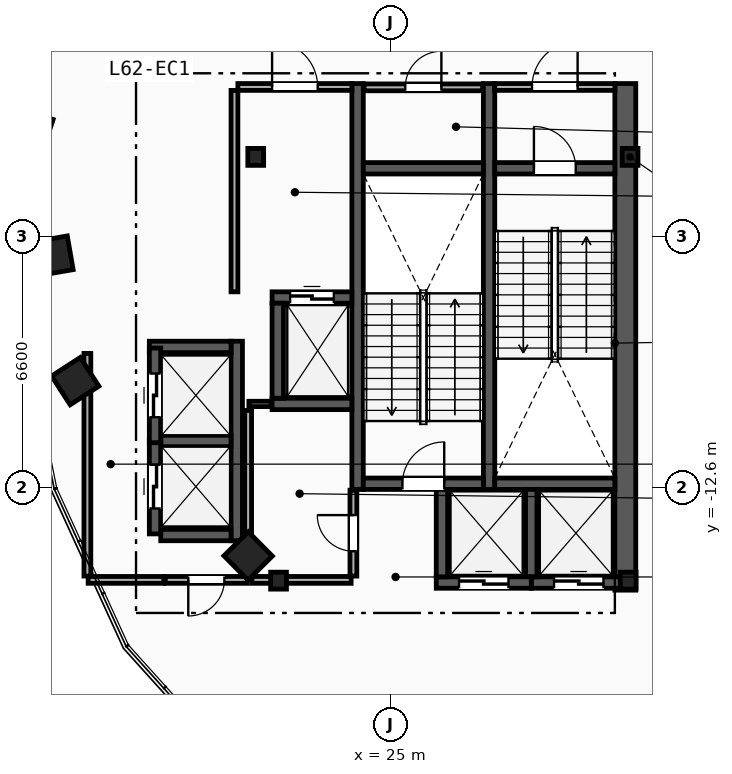
"""IFC4 building model, lengths in metres.
Left out: names, types, materials, properties, quantities, classifications, styles, units other than length and angle.
Written with IfcOpenShell. Run it as: python <this file> out.ifc"""

import sys

from ifc_helpers import new_model, si_unit, direction, frame, frame_2d, origin, origin_2d, place, context, subcontext, project, spatial, rectangle, i_section, extrude, element, fill, save


model = new_model("IFC4")
c1 = context("Model", 3, precision=1e-05, world=origin(), true_north=direction((0.0, 1.0)))
c2 = subcontext(c1, "Body", "Model", "MODEL_VIEW")
j1 = project(units=[si_unit("LENGTHUNIT", "METRE"), si_unit("PLANEANGLEUNIT", "RADIAN")], contexts=[c1])
p1 = place(None, origin())
s1 = spatial("IfcSite", under=j1, at=p1, CompositionType="ELEMENT")
p2 = place(p1, origin())
s2 = spatial("IfcBuilding", under=s1, at=p2, CompositionType="ELEMENT")
p3 = place(p2, frame((0.0, 0.0, 235.0)))
s3 = spatial("IfcBuildingStorey", under=s2, at=p3, CompositionType="ELEMENT", Elevation=235.0)
for number, where, z_axis, x_axis in (
    (1, (31.3, -3.9, 0.0), (0.0, 0.0, 1.0), (1.0, 0.0, 0.0)),
    (2, (21.45, -3.9, 0.0), (0.0, 0.0, 1.0), (1.0, 0.0, 0.0)),
    (3, (22.05, -15.05, 0.0), (0.0, 0.0, 1.0), (1.0, 0.0, 0.0)),
    (4, (31.25, -15.05, 0.0), (0.0, 0.0, 1.0), (1.0, 0.0, 0.0)),
):
    element("IfcColumn", number, at=place(p3, frame(where, z_axis=z_axis, x_axis=x_axis)), inside=s3, PredefinedType="COLUMN", context=c2, shape_type="SweptSolid", body=[
        extrude(i_section(OverallWidth=0.416, OverallDepth=0.446, WebThickness=0.039, FlangeThickness=0.063, FilletRadius=0.018, at=origin_2d()), origin(), (0.0, 0.0, 1.0), 4.6),
    ])
for number, where, z_axis, x_axis in (
    (5, (15.55, -3.2, 0.0), (0.0, 0.0, 1.0), (-0.315, -0.949, 0.0)),
    (6, (16.125, -6.5, 0.0), (0.0, 0.0, 1.0), (0.172, -0.985, 0.0)),
    (7, (16.7, -9.8, 0.0), (0.0, 0.0, 1.0), (0.544, -0.839, 0.0)),
    (8, (21.25, -14.4, 0.0), (0.0, 0.0, 1.0), (0.703, -0.711, 0.0)),
):
    element("IfcColumn", number, at=place(p3, frame(where, z_axis=z_axis, x_axis=x_axis)), inside=s3, PredefinedType="COLUMN", context=c2, shape_type="SweptSolid", body=[
        extrude(rectangle(XDim=0.9, YDim=0.9, at=origin_2d()), origin(), (0.0, 0.0, 1.0), 4.6),
    ])
p4 = place(p3, frame((31.175, -15.3, 0.0), z_axis=(0.0, 0.0, 1.0), x_axis=(0.0, 1.0, 0.0)))
e9 = element("IfcWall", 9, at=p4, inside=s3, PredefinedType="SHEAR", context=c2, shape_type="SweptSolid", body=[
    extrude(rectangle(XDim=13.33, YDim=0.55, at=frame_2d((6.665, 0.0))), origin(), (0.0, 0.0, 1.0), 4.34),
])
for number, where, z_axis, x_axis in (
    (10, (27.59, -12.65, 0.0), (0.0, 0.0, 1.0), (0.0, 1.0, 0.0)),
    (11, (24.13, -12.65, 0.0), (0.0, 0.0, 1.0), (0.0, 1.0, 0.0)),
):
    element("IfcWall", number, at=place(p3, frame(where, z_axis=z_axis, x_axis=x_axis)), inside=s3, PredefinedType="SHEAR", context=c2, shape_type="SweptSolid", body=[
        extrude(rectangle(XDim=10.68, YDim=0.3, at=frame_2d((5.34, 0.0))), origin(), (0.0, 0.0, 1.0), 4.34),
    ])
p5 = place(p3, frame((27.74, -4.2, 0.0), z_axis=(0.0, 0.0, 1.0), x_axis=(1.0, 0.0, 0.0)))
e12 = element("IfcWall", 12, at=p5, inside=s3, PredefinedType="SHEAR", context=c2, shape_type="SweptSolid", body=[
    extrude(rectangle(XDim=3.16, YDim=0.3, at=frame_2d((1.58, 0.0))), origin(), (0.0, 0.0, 1.0), 4.34),
])
p6 = place(p5, frame((1.03, 0.0, 0.0)))
e13 = element("IfcOpeningElement", 13, at=p6, cuts=e12, PredefinedType="OPENING", context=c2, shape_type="SweptSolid", body=[
    extrude(rectangle(XDim=1.1, YDim=2.15, at=frame_2d((0.55, 1.075))), frame((0.0, 0.16, 0.0), z_axis=(0.0, -1.0, 0.0), x_axis=(1.0, 0.0, 0.0)), (0.0, 0.0, 1.0), 0.32),
])
p7 = place(p3, frame((27.74, -12.5, 0.0), z_axis=(0.0, 0.0, 1.0), x_axis=(1.0, 0.0, 0.0)))
e14 = element("IfcWall", 14, at=p7, inside=s3, PredefinedType="SHEAR", context=c2, shape_type="SweptSolid", body=[
    extrude(rectangle(XDim=3.16, YDim=0.3, at=frame_2d((1.58, 0.0))), origin(), (0.0, 0.0, 1.0), 4.34),
])
p8 = place(p3, frame((24.28, -12.5, 0.0), z_axis=(0.0, 0.0, 1.0), x_axis=(1.0, 0.0, 0.0)))
e15 = element("IfcWall", 15, at=p8, inside=s3, PredefinedType="SHEAR", context=c2, shape_type="SweptSolid", body=[
    extrude(rectangle(XDim=3.16, YDim=0.3, at=frame_2d((1.58, 0.0))), origin(), (0.0, 0.0, 1.0), 4.34),
])
p9 = place(p8, frame((1.03, 0.0, 0.0)))
e16 = element("IfcOpeningElement", 16, at=p9, cuts=e15, PredefinedType="OPENING", context=c2, shape_type="SweptSolid", body=[
    extrude(rectangle(XDim=1.1, YDim=2.15, at=frame_2d((0.55, 1.075))), frame((0.0, 0.16, 0.0), z_axis=(0.0, -1.0, 0.0), x_axis=(1.0, 0.0, 0.0)), (0.0, 0.0, 1.0), 0.32),
])
p10 = place(p3, frame((24.28, -4.2, 0.0), z_axis=(0.0, 0.0, 1.0), x_axis=(1.0, 0.0, 0.0)))
e17 = element("IfcWall", 17, at=p10, inside=s3, PredefinedType="SHEAR", context=c2, shape_type="SweptSolid", body=[
    extrude(rectangle(XDim=3.16, YDim=0.3, at=frame_2d((1.58, 0.0))), origin(), (0.0, 0.0, 1.0), 4.34),
])
p11 = place(p3, frame((20.89, -7.45, 0.0), z_axis=(0.0, 0.0, 1.0), x_axis=(0.0, 1.0, 0.0)))
e18 = element("IfcWall", 18, at=p11, inside=s3, PredefinedType="PARTITIONING", context=c2, shape_type="SweptSolid", body=[
    extrude(rectangle(XDim=5.3, YDim=0.18, at=frame_2d((2.65, 0.0))), origin(), (0.0, 0.0, 1.0), 4.34),
])
p12 = place(p3, frame((20.98, -2.06, 0.0), z_axis=(0.0, 0.0, 1.0), x_axis=(1.0, 0.0, 0.0)))
e19 = element("IfcWall", 19, at=p12, inside=s3, PredefinedType="PARTITIONING", context=c2, shape_type="SweptSolid", body=[
    extrude(rectangle(XDim=3.0, YDim=0.18, at=frame_2d((1.5, 0.0))), origin(), (0.0, 0.0, 1.0), 4.34),
])
p13 = place(p12, frame((0.9, 0.0, 0.0)))
e20 = element("IfcOpeningElement", 20, at=p13, cuts=e19, PredefinedType="OPENING", context=c2, shape_type="SweptSolid", body=[
    extrude(rectangle(XDim=1.2, YDim=2.15, at=frame_2d((0.6, 1.075))), frame((0.0, 0.1, 0.0), z_axis=(0.0, -1.0, 0.0), x_axis=(1.0, 0.0, 0.0)), (0.0, 0.0, 1.0), 0.2),
])
p14 = place(p3, frame((27.74, -2.06, 0.0), z_axis=(0.0, 0.0, 1.0), x_axis=(1.0, 0.0, 0.0)))
e21 = element("IfcWall", 21, at=p14, inside=s3, PredefinedType="PARTITIONING", context=c2, shape_type="SweptSolid", body=[
    extrude(rectangle(XDim=3.16, YDim=0.18, at=frame_2d((1.58, 0.0))), origin(), (0.0, 0.0, 1.0), 4.34),
])
p15 = place(p14, frame((0.98, 0.0, 0.0)))
e22 = element("IfcOpeningElement", 22, at=p15, cuts=e21, PredefinedType="OPENING", context=c2, shape_type="SweptSolid", body=[
    extrude(rectangle(XDim=1.2, YDim=2.15, at=frame_2d((0.6, 1.075))), frame((0.0, 0.1, 0.0), z_axis=(0.0, -1.0, 0.0), x_axis=(1.0, 0.0, 0.0)), (0.0, 0.0, 1.0), 0.2),
])
p16 = place(p3, frame((21.88, -7.6, 0.0), z_axis=(0.0, 0.0, 1.0), x_axis=(1.0, 0.0, 0.0)))
e23 = element("IfcWall", 23, at=p16, inside=s3, PredefinedType="SHEAR", context=c2, shape_type="SweptSolid", body=[
    extrude(rectangle(XDim=2.1, YDim=0.3, at=frame_2d((1.05, 0.0))), origin(), (0.0, 0.0, 1.0), 4.34),
])
p17 = place(p16, frame((0.475, 0.0, 0.0)))
e24 = element("IfcOpeningElement", 24, at=p17, cuts=e23, PredefinedType="OPENING", context=c2, shape_type="SweptSolid", body=[
    extrude(rectangle(XDim=1.15, YDim=2.2, at=frame_2d((0.575, 1.1))), frame((0.0, 0.16, 0.0), z_axis=(0.0, -1.0, 0.0), x_axis=(1.0, 0.0, 0.0)), (0.0, 0.0, 1.0), 0.32),
])
p18 = place(p3, frame((21.88, -10.4, 0.0), z_axis=(0.0, 0.0, 1.0), x_axis=(1.0, 0.0, 0.0)))
e25 = element("IfcWall", 25, at=p18, inside=s3, PredefinedType="SHEAR", context=c2, shape_type="SweptSolid", body=[
    extrude(rectangle(XDim=2.1, YDim=0.3, at=frame_2d((1.05, 0.0))), origin(), (0.0, 0.0, 1.0), 4.34),
])
p19 = place(p3, frame((22.03, -10.25, 0.0), z_axis=(0.0, 0.0, 1.0), x_axis=(0.0, 1.0, 0.0)))
e26 = element("IfcWall", 26, at=p19, inside=s3, PredefinedType="SHEAR", context=c2, shape_type="SweptSolid", body=[
    extrude(rectangle(XDim=2.5, YDim=0.3, at=frame_2d((1.25, 0.0))), origin(), (0.0, 0.0, 1.0), 4.34),
])
p20 = place(p3, frame((28.7, -15.1, 0.0), z_axis=(0.0, 0.0, 1.0), x_axis=(1.0, 0.0, 0.0)))
e27 = element("IfcWall", 27, at=p20, inside=s3, PredefinedType="SHEAR", context=c2, shape_type="SweptSolid", body=[
    extrude(rectangle(XDim=2.5, YDim=0.3, at=frame_2d((1.25, 0.0))), origin(), (0.0, 0.0, 1.0), 4.34),
])
p21 = place(p20, frame((0.6, 0.0, 0.0)))
e28 = element("IfcOpeningElement", 28, at=p21, cuts=e27, PredefinedType="OPENING", context=c2, shape_type="SweptSolid", body=[
    extrude(rectangle(XDim=1.3, YDim=2.2, at=frame_2d((0.65, 1.1))), frame((0.0, 0.16, 0.0), z_axis=(0.0, -1.0, 0.0), x_axis=(1.0, 0.0, 0.0)), (0.0, 0.0, 1.0), 0.32),
])
p22 = place(p3, frame((28.7, -14.95, 0.0), z_axis=(0.0, 0.0, 1.0), x_axis=(0.0, 1.0, 0.0)))
e29 = element("IfcWall", 29, at=p22, inside=s3, PredefinedType="SHEAR", context=c2, shape_type="SweptSolid", body=[
    extrude(rectangle(XDim=2.3, YDim=0.3, at=frame_2d((1.15, 0.0))), origin(), (0.0, 0.0, 1.0), 4.34),
])
p23 = place(p3, frame((26.2, -15.1, 0.0), z_axis=(0.0, 0.0, 1.0), x_axis=(1.0, 0.0, 0.0)))
e30 = element("IfcWall", 30, at=p23, inside=s3, PredefinedType="SHEAR", context=c2, shape_type="SweptSolid", body=[
    extrude(rectangle(XDim=2.5, YDim=0.3, at=frame_2d((1.25, 0.0))), origin(), (0.0, 0.0, 1.0), 4.34),
])
p24 = place(p23, frame((0.6, 0.0, 0.0)))
e31 = element("IfcOpeningElement", 31, at=p24, cuts=e30, PredefinedType="OPENING", context=c2, shape_type="SweptSolid", body=[
    extrude(rectangle(XDim=1.3, YDim=2.2, at=frame_2d((0.65, 1.1))), frame((0.0, 0.16, 0.0), z_axis=(0.0, -1.0, 0.0), x_axis=(1.0, 0.0, 0.0)), (0.0, 0.0, 1.0), 0.32),
])
p25 = place(p3, frame((26.35, -14.95, 0.0), z_axis=(0.0, 0.0, 1.0), x_axis=(0.0, 1.0, 0.0)))
e32 = element("IfcWall", 32, at=p25, inside=s3, PredefinedType="SHEAR", context=c2, shape_type="SweptSolid", body=[
    extrude(rectangle(XDim=2.3, YDim=0.3, at=frame_2d((1.15, 0.0))), origin(), (0.0, 0.0, 1.0), 4.34),
])
p26 = place(p3, frame((20.95, -14.0, 0.0), z_axis=(0.0, 0.0, 1.0), x_axis=(0.0, 1.0, 0.0)))
e33 = element("IfcWall", 33, at=p26, inside=s3, PredefinedType="SHEAR", context=c2, shape_type="SweptSolid", body=[
    extrude(rectangle(XDim=5.25, YDim=0.3, at=frame_2d((2.625, 0.0))), origin(), (0.0, 0.0, 1.0), 4.34),
])
p27 = place(p3, frame((18.95, -13.85, 0.0), z_axis=(0.0, 0.0, 1.0), x_axis=(1.0, 0.0, 0.0)))
e34 = element("IfcWall", 34, at=p27, inside=s3, PredefinedType="SHEAR", context=c2, shape_type="SweptSolid", body=[
    extrude(rectangle(XDim=1.85, YDim=0.3, at=frame_2d((0.925, 0.0))), origin(), (0.0, 0.0, 1.0), 4.34),
])
p28 = place(p3, frame((18.65, -8.9, 0.0), z_axis=(0.0, 0.0, 1.0), x_axis=(1.0, 0.0, 0.0)))
e35 = element("IfcWall", 35, at=p28, inside=s3, PredefinedType="SHEAR", context=c2, shape_type="SweptSolid", body=[
    extrude(rectangle(XDim=2.15, YDim=0.3, at=frame_2d((1.075, 0.0))), origin(), (0.0, 0.0, 1.0), 4.34),
])
p29 = place(p3, frame((18.95, -11.375, 0.0), z_axis=(0.0, 0.0, 1.0), x_axis=(1.0, 0.0, 0.0)))
e36 = element("IfcWall", 36, at=p29, inside=s3, PredefinedType="SHEAR", context=c2, shape_type="SweptSolid", body=[
    extrude(rectangle(XDim=1.85, YDim=0.3, at=frame_2d((0.925, 0.0))), origin(), (0.0, 0.0, 1.0), 4.34),
])
p30 = place(p3, frame((18.8, -13.82, 0.0), z_axis=(0.0, 0.0, 1.0), x_axis=(0.0, 1.0, 0.0)))
e37 = element("IfcWall", 37, at=p30, inside=s3, PredefinedType="SHEAR", context=c2, shape_type="SweptSolid", body=[
    extrude(rectangle(XDim=2.49, YDim=0.3, at=frame_2d((1.245, 0.0))), origin(), (0.0, 0.0, 1.0), 4.34),
])
p31 = place(p30, frame((0.67, 0.0, 0.0)))
e38 = element("IfcOpeningElement", 38, at=p31, cuts=e37, PredefinedType="OPENING", context=c2, shape_type="SweptSolid", body=[
    extrude(rectangle(XDim=1.15, YDim=2.2, at=frame_2d((0.575, 1.1))), frame((0.0, 0.16, 0.0), z_axis=(0.0, -1.0, 0.0), x_axis=(1.0, 0.0, 0.0)), (0.0, 0.0, 1.0), 0.32),
])
p32 = place(p3, frame((18.8, -11.42, 0.0), z_axis=(0.0, 0.0, 1.0), x_axis=(0.0, 1.0, 0.0)))
e39 = element("IfcWall", 39, at=p32, inside=s3, PredefinedType="SHEAR", context=c2, shape_type="SweptSolid", body=[
    extrude(rectangle(XDim=2.49, YDim=0.3, at=frame_2d((1.245, 0.0))), origin(), (0.0, 0.0, 1.0), 4.34),
])
p33 = place(p32, frame((0.67, 0.0, 0.0)))
e40 = element("IfcOpeningElement", 40, at=p33, cuts=e39, PredefinedType="OPENING", context=c2, shape_type="SweptSolid", body=[
    extrude(rectangle(XDim=1.15, YDim=2.2, at=frame_2d((0.575, 1.1))), frame((0.0, 0.16, 0.0), z_axis=(0.0, -1.0, 0.0), x_axis=(1.0, 0.0, 0.0)), (0.0, 0.0, 1.0), 0.32),
])
p34 = place(p3, frame((17.02, -14.93, 0.0), z_axis=(0.0, 0.0, 1.0), x_axis=(0.0, 1.0, 0.0)))
e41 = element("IfcWall", 41, at=p34, inside=s3, PredefinedType="PARTITIONING", context=c2, shape_type="SweptSolid", body=[
    extrude(rectangle(XDim=5.86, YDim=0.18, at=frame_2d((2.93, 0.0))), origin(), (0.0, 0.0, 1.0), 4.34),
])
p35 = place(p3, frame((17.04, -15.03, 0.0), z_axis=(0.0, 0.0, 1.0), x_axis=(1.0, 0.0, 0.0)))
e42 = element("IfcWall", 42, at=p35, inside=s3, PredefinedType="PARTITIONING", context=c2, shape_type="SweptSolid", body=[
    extrude(rectangle(XDim=1.99, YDim=0.18, at=frame_2d((0.995, 0.0))), origin(), (0.0, 0.0, 1.0), 4.34),
])
p36 = place(p3, frame((21.23, -15.03, 0.0), z_axis=(0.0, 0.0, 1.0), x_axis=(-1.0, 0.0, 0.0)))
e43 = element("IfcWall", 43, at=p36, inside=s3, PredefinedType="PARTITIONING", context=c2, shape_type="SweptSolid", body=[
    extrude(rectangle(XDim=2.16, YDim=0.18, at=frame_2d((1.08, 0.0))), origin(), (0.0, 0.0, 1.0), 4.34),
])
p37 = place(p36, frame((0.605, 0.0, 0.0)))
e44 = element("IfcOpeningElement", 44, at=p37, cuts=e43, PredefinedType="OPENING", context=c2, shape_type="SweptSolid", body=[
    extrude(rectangle(XDim=0.95, YDim=2.1, at=frame_2d((0.475, 1.05))), frame((0.0, 0.1, 0.0), z_axis=(0.0, -1.0, 0.0), x_axis=(1.0, 0.0, 0.0)), (0.0, 0.0, 1.0), 0.2),
])
p38 = place(p3, frame((21.27, -10.4, 0.0), z_axis=(0.0, 0.0, 1.0), x_axis=(1.0, 0.0, 0.0)))
e45 = element("IfcWall", 45, at=p38, inside=s3, PredefinedType="PARTITIONING", context=c2, shape_type="SweptSolid", body=[
    extrude(rectangle(XDim=0.59, YDim=0.14, at=frame_2d((0.295, 0.0))), origin(), (0.0, 0.0, 1.0), 4.34),
])
p39 = place(p3, frame((21.25, -14.93, 0.0), z_axis=(0.0, 0.0, 1.0), x_axis=(0.0, 1.0, 0.0)))
e46 = element("IfcWall", 46, at=p39, inside=s3, PredefinedType="PARTITIONING", context=c2, shape_type="SweptSolid", body=[
    extrude(rectangle(XDim=4.36, YDim=0.18, at=frame_2d((2.18, 0.0))), origin(), (0.0, 0.0, 1.0), 4.34),
])
p40 = place(p3, frame((21.35, -15.03, 0.0), z_axis=(0.0, 0.0, 1.0), x_axis=(1.0, 0.0, 0.0)))
e47 = element("IfcWall", 47, at=p40, inside=s3, PredefinedType="PARTITIONING", context=c2, shape_type="SweptSolid", body=[
    extrude(rectangle(XDim=2.61, YDim=0.18, at=frame_2d((1.305, 0.0))), origin(), (0.0, 0.0, 1.0), 3.413),
])
p41 = place(p3, frame((24.3, -2.07, 0.0), z_axis=(0.0, 0.0, 1.0), x_axis=(1.0, 0.0, 0.0)))
e48 = element("IfcWall", 48, at=p41, inside=s3, PredefinedType="PARTITIONING", context=c2, shape_type="SweptSolid", body=[
    extrude(rectangle(XDim=3.12, YDim=0.18, at=frame_2d((1.56, 0.0))), origin(), (0.0, 0.0, 1.0), 4.34),
])
p42 = place(p41, frame((1.085, 0.0, 0.0)))
e49 = element("IfcOpeningElement", 49, at=p42, cuts=e48, PredefinedType="OPENING", context=c2, shape_type="SweptSolid", body=[
    extrude(rectangle(XDim=0.95, YDim=2.1, at=frame_2d((0.475, 1.05))), frame((0.0, 0.1, 0.0), z_axis=(0.0, -1.0, 0.0), x_axis=(1.0, 0.0, 0.0)), (0.0, 0.0, 1.0), 0.2),
])
p43 = place(p3, frame((24.02, -14.93, 0.0), z_axis=(0.0, 0.0, 1.0), x_axis=(0.0, 1.0, 0.0)))
e50 = element("IfcWall", 50, at=p43, inside=s3, PredefinedType="PARTITIONING", context=c2, shape_type="SweptSolid", body=[
    extrude(rectangle(XDim=2.26, YDim=0.18, at=frame_2d((1.13, 0.0))), origin(), (0.0, 0.0, 1.0), 4.34),
])
p44 = place(p43, frame((0.655, 0.0, 0.0)))
e51 = element("IfcOpeningElement", 51, at=p44, cuts=e50, PredefinedType="OPENING", context=c2, shape_type="SweptSolid", body=[
    extrude(rectangle(XDim=0.95, YDim=2.1, at=frame_2d((0.475, 1.05))), frame((0.0, 0.1, 0.0), z_axis=(0.0, -1.0, 0.0), x_axis=(1.0, 0.0, 0.0)), (0.0, 0.0, 1.0), 0.2),
])
p45 = place(p6, origin())
e52 = element("IfcDoor", 52, at=p45, inside=s3, OperationType="SINGLE_SWING_LEFT", PredefinedType="DOOR", context=c2, shape_type="SweptSolid", body=[
    extrude(rectangle(XDim=1.1, YDim=2.15, at=frame_2d((0.55, 1.075))), frame((0.0, 0.025, 0.0), z_axis=(0.0, -1.0, 0.0), x_axis=(1.0, 0.0, 0.0)), (0.0, 0.0, 1.0), 0.05),
])
fill(e13, e52)
p46 = place(p9, origin())
e53 = element("IfcDoor", 53, at=p46, inside=s3, OperationType="SINGLE_SWING_RIGHT", PredefinedType="DOOR", context=c2, shape_type="SweptSolid", body=[
    extrude(rectangle(XDim=1.1, YDim=2.15, at=frame_2d((0.55, 1.075))), frame((0.0, 0.025, 0.0), z_axis=(0.0, -1.0, 0.0), x_axis=(1.0, 0.0, 0.0)), (0.0, 0.0, 1.0), 0.05),
])
fill(e16, e53)
p47 = place(p13, origin())
e54 = element("IfcDoor", 54, at=p47, inside=s3, OperationType="SINGLE_SWING_LEFT", PredefinedType="DOOR", context=c2, shape_type="SweptSolid", body=[
    extrude(rectangle(XDim=1.2, YDim=2.15, at=frame_2d((0.6, 1.075))), frame((0.0, 0.025, 0.0), z_axis=(0.0, -1.0, 0.0), x_axis=(1.0, 0.0, 0.0)), (0.0, 0.0, 1.0), 0.05),
])
fill(e20, e54)
p48 = place(p15, origin())
e55 = element("IfcDoor", 55, at=p48, inside=s3, OperationType="SINGLE_SWING_RIGHT", PredefinedType="DOOR", context=c2, shape_type="SweptSolid", body=[
    extrude(rectangle(XDim=1.2, YDim=2.15, at=frame_2d((0.6, 1.075))), frame((0.0, 0.025, 0.0), z_axis=(0.0, -1.0, 0.0), x_axis=(1.0, 0.0, 0.0)), (0.0, 0.0, 1.0), 0.05),
])
fill(e22, e55)
p49 = place(p17, origin())
e56 = element("IfcDoor", 56, at=p49, inside=s3, OperationType="SLIDING_TO_LEFT", PredefinedType="TRAPDOOR", context=c2, shape_type="SweptSolid", body=[
    extrude(rectangle(XDim=1.15, YDim=2.2, at=frame_2d((0.575, 1.1))), frame((0.0, 0.025, 0.0), z_axis=(0.0, -1.0, 0.0), x_axis=(1.0, 0.0, 0.0)), (0.0, 0.0, 1.0), 0.05),
])
fill(e24, e56)
p50 = place(p21, origin())
e57 = element("IfcDoor", 57, at=p50, inside=s3, OperationType="SLIDING_TO_LEFT", PredefinedType="TRAPDOOR", context=c2, shape_type="SweptSolid", body=[
    extrude(rectangle(XDim=1.3, YDim=2.2, at=frame_2d((0.65, 1.1))), frame((0.0, 0.025, 0.0), z_axis=(0.0, -1.0, 0.0), x_axis=(1.0, 0.0, 0.0)), (0.0, 0.0, 1.0), 0.05),
])
fill(e28, e57)
p51 = place(p24, origin())
e58 = element("IfcDoor", 58, at=p51, inside=s3, OperationType="SLIDING_TO_LEFT", PredefinedType="TRAPDOOR", context=c2, shape_type="SweptSolid", body=[
    extrude(rectangle(XDim=1.3, YDim=2.2, at=frame_2d((0.65, 1.1))), frame((0.0, 0.025, 0.0), z_axis=(0.0, -1.0, 0.0), x_axis=(1.0, 0.0, 0.0)), (0.0, 0.0, 1.0), 0.05),
])
fill(e31, e58)
p52 = place(p31, origin())
e59 = element("IfcDoor", 59, at=p52, inside=s3, OperationType="SLIDING_TO_LEFT", PredefinedType="TRAPDOOR", context=c2, shape_type="SweptSolid", body=[
    extrude(rectangle(XDim=1.15, YDim=2.2, at=frame_2d((0.575, 1.1))), frame((0.0, 0.025, 0.0), z_axis=(0.0, -1.0, 0.0), x_axis=(1.0, 0.0, 0.0)), (0.0, 0.0, 1.0), 0.05),
])
fill(e38, e59)
p53 = place(p33, origin())
e60 = element("IfcDoor", 60, at=p53, inside=s3, OperationType="SLIDING_TO_LEFT", PredefinedType="TRAPDOOR", context=c2, shape_type="SweptSolid", body=[
    extrude(rectangle(XDim=1.15, YDim=2.2, at=frame_2d((0.575, 1.1))), frame((0.0, 0.025, 0.0), z_axis=(0.0, -1.0, 0.0), x_axis=(1.0, 0.0, 0.0)), (0.0, 0.0, 1.0), 0.05),
])
fill(e40, e60)
p54 = place(p42, origin())
e61 = element("IfcDoor", 61, at=p54, inside=s3, OperationType="SINGLE_SWING_RIGHT", PredefinedType="DOOR", context=c2, shape_type="SweptSolid", body=[
    extrude(rectangle(XDim=0.95, YDim=2.1, at=frame_2d((0.475, 1.05))), frame((0.0, 0.025, 0.0), z_axis=(0.0, -1.0, 0.0), x_axis=(1.0, 0.0, 0.0)), (0.0, 0.0, 1.0), 0.05),
])
fill(e49, e61)
p55 = place(p44, origin())
e62 = element("IfcDoor", 62, at=p55, inside=s3, OperationType="SINGLE_SWING_RIGHT", PredefinedType="DOOR", context=c2, shape_type="SweptSolid", body=[
    extrude(rectangle(XDim=0.95, YDim=2.1, at=frame_2d((0.475, 1.05))), frame((0.0, 0.025, 0.0), z_axis=(0.0, -1.0, 0.0), x_axis=(1.0, 0.0, 0.0)), (0.0, 0.0, 1.0), 0.05),
])
fill(e51, e62)
p56 = place(p37, origin())
e63 = element("IfcDoor", 63, at=p56, inside=s3, OperationType="SINGLE_SWING_RIGHT", PredefinedType="DOOR", context=c2, shape_type="SweptSolid", body=[
    extrude(rectangle(XDim=0.95, YDim=2.1, at=frame_2d((0.475, 1.05))), frame((0.0, 0.025, 0.0), z_axis=(0.0, -1.0, 0.0), x_axis=(1.0, 0.0, 0.0)), (0.0, 0.0, 1.0), 0.05),
])
fill(e44, e63)
save(model, sys.argv[1])
